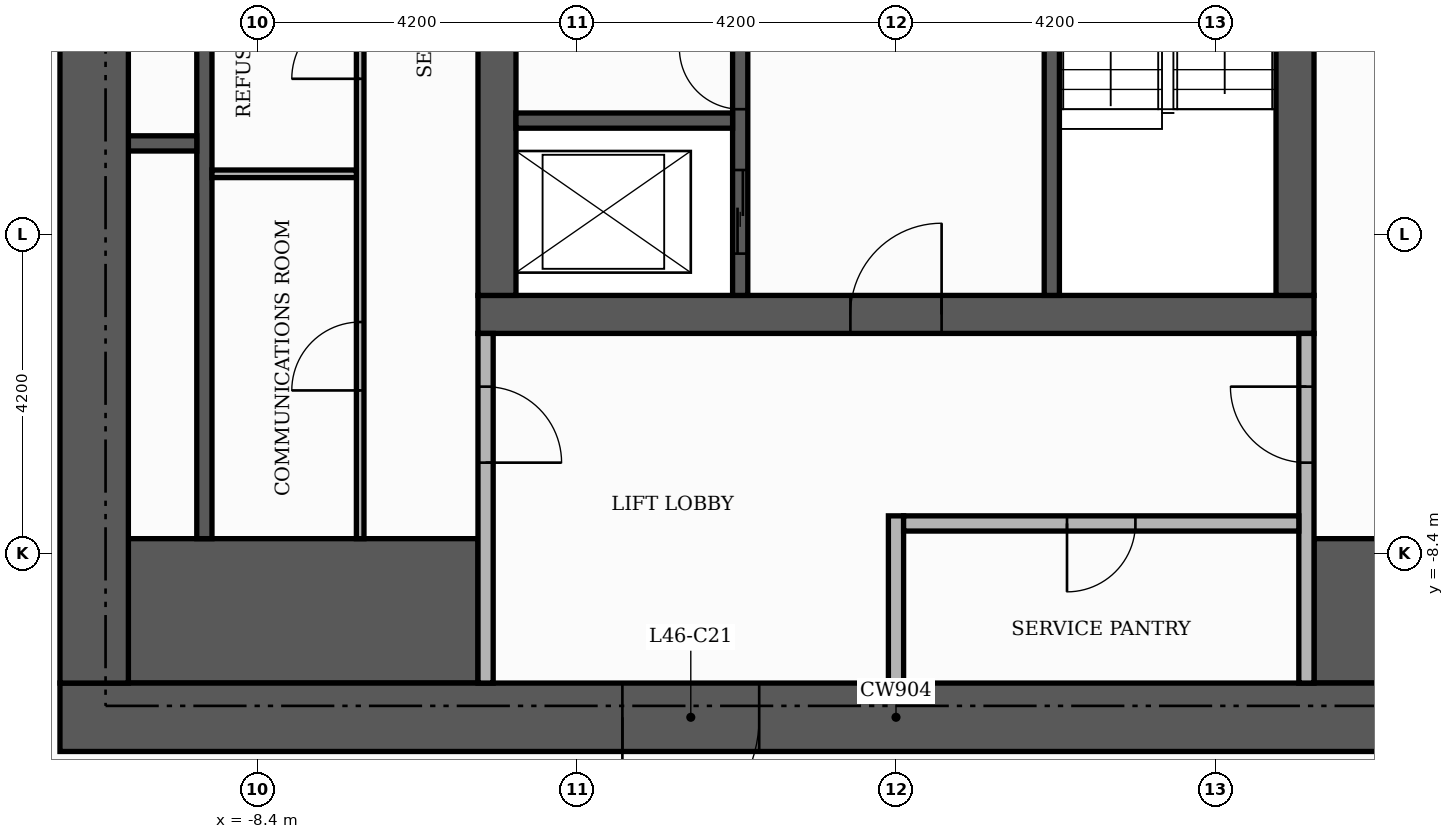
"""IFC4 building model, lengths in metres.
Left out: names, types, materials, properties, quantities, classifications, styles, units other than length and angle.
Written with IfcOpenShell. Run it as: python <this file> out.ifc"""

import sys

from ifc_helpers import new_model, si_unit, direction, frame, frame_2d, origin, place, context, subcontext, project, spatial, rectangle, extrude, element, fill, save


model = new_model("IFC4")
c1 = context("Model", 3, precision=1e-05, world=origin(), true_north=direction((0.0, 1.0)))
c2 = subcontext(c1, "Body", "Model", "MODEL_VIEW")
j1 = project(units=[si_unit("LENGTHUNIT", "METRE"), si_unit("PLANEANGLEUNIT", "RADIAN")], contexts=[c1])
p1 = place(None, origin())
s1 = spatial("IfcSite", under=j1, at=p1, CompositionType="ELEMENT")
p2 = place(p1, origin())
s2 = spatial("IfcBuilding", under=s1, at=p2, CompositionType="ELEMENT")
p3 = place(p2, frame((0.0, 0.0, 196.2)))
s3 = spatial("IfcBuildingStorey", under=s2, at=p3, CompositionType="ELEMENT", Elevation=196.2)
p4 = place(p3, frame((-5.5, -5.25, 0.0), z_axis=(0.0, 0.0, 1.0), x_axis=(1.0, 0.0, 0.0)))
e1 = element("IfcWall", 1, at=p4, inside=s3, PredefinedType="SHEAR", context=c2, shape_type="SweptSolid", body=[
    extrude(rectangle(XDim=11.0, YDim=0.5, at=frame_2d((5.5, 0.0))), origin(), (0.0, 0.0, 1.0), 3.48),
])
p5 = place(p4, frame((4.9, 0.0, 0.0)))
e2 = element("IfcOpeningElement", 2, at=p5, cuts=e1, PredefinedType="OPENING", context=c2, shape_type="SweptSolid", body=[
    extrude(rectangle(XDim=1.2, YDim=2.1, at=frame_2d((0.6, 1.05))), frame((0.0, 0.26, 0.0), z_axis=(0.0, -1.0, 0.0), x_axis=(1.0, 0.0, 0.0)), (0.0, 0.0, 1.0), 0.52),
])
for number, where, z_axis, x_axis in (
    (3, (-5.25, -5.0, 0.0), (0.0, 0.0, 1.0), (0.0, 1.0, 0.0)),
    (4, (5.25, -5.0, 0.0), (0.0, 0.0, 1.0), (0.0, 1.0, 0.0)),
):
    element("IfcWall", number, at=place(p3, frame(where, z_axis=z_axis, x_axis=x_axis)), inside=s3, PredefinedType="SHEAR", context=c2, shape_type="SweptSolid", body=[
        extrude(rectangle(XDim=10.5, YDim=0.5, at=frame_2d((5.25, 0.0))), origin(), (0.0, 0.0, 1.0), 3.48),
    ])
for number, where, z_axis, x_axis in (
    (5, (-10.1, -9.15, 0.0), (0.0, 0.0, 1.0), (1.0, 0.0, 0.0)),
    (6, (5.5, -9.15, 0.0), (0.0, 0.0, 1.0), (1.0, 0.0, 0.0)),
):
    element("IfcWall", number, at=place(p3, frame(where, z_axis=z_axis, x_axis=x_axis)), inside=s3, PredefinedType="SHEAR", context=c2, shape_type="SweptSolid", body=[
        extrude(rectangle(XDim=4.6, YDim=1.9, at=frame_2d((2.3, 0.0))), origin(), (0.0, 0.0, 1.0), 3.48),
    ])
p6 = place(p3, frame((2.05, -5.0, 0.0), z_axis=(0.0, 0.0, 1.0), x_axis=(0.0, 1.0, 0.0)))
e7 = element("IfcWall", 7, at=p6, inside=s3, PredefinedType="SHEAR", context=c2, shape_type="SweptSolid", body=[
    extrude(rectangle(XDim=6.6, YDim=0.2, at=frame_2d((3.3, 0.0))), origin(), (0.0, 0.0, 1.0), 3.48),
])
p7 = place(p6, frame((5.25, 0.0, 0.0)))
e8 = element("IfcOpeningElement", 8, at=p7, cuts=e7, PredefinedType="OPENING", context=c2, shape_type="SweptSolid", body=[
    extrude(rectangle(XDim=1.0, YDim=2.1, at=frame_2d((0.5, 1.05))), frame((0.0, 0.11, 0.0), z_axis=(0.0, -1.0, 0.0), x_axis=(1.0, 0.0, 0.0)), (0.0, 0.0, 1.0), 0.22),
])
p8 = place(p3, frame((-9.1, -8.2, 0.0), z_axis=(0.0, 0.0, 1.0), x_axis=(0.0, 1.0, 0.0)))
e9 = element("IfcWall", 9, at=p8, inside=s3, PredefinedType="SHEAR", context=c2, shape_type="SweptSolid", body=[
    extrude(rectangle(XDim=16.4, YDim=0.2, at=frame_2d((8.2, 0.0))), origin(), (0.0, 0.0, 1.0), 3.48),
])
p9 = place(p3, frame((-2.05, -5.0, 0.0), z_axis=(0.0, 0.0, 1.0), x_axis=(0.0, 1.0, 0.0)))
e10 = element("IfcWall", 10, at=p9, inside=s3, PredefinedType="SHEAR", context=c2, shape_type="SweptSolid", body=[
    extrude(rectangle(XDim=3.4, YDim=0.2, at=frame_2d((1.7, 0.0))), origin(), (0.0, 0.0, 1.0), 3.48),
])
p10 = place(p9, frame((0.55, 0.0, 0.0)))
e11 = element("IfcOpeningElement", 11, at=p10, cuts=e10, PredefinedType="OPENING", context=c2, shape_type="SweptSolid", body=[
    extrude(rectangle(XDim=1.1, YDim=2.1, at=frame_2d((0.55, 1.05))), frame((0.0, 0.11, 0.0), z_axis=(0.0, -1.0, 0.0), x_axis=(1.0, 0.0, 0.0)), (0.0, 0.0, 1.0), 0.22),
])
p11 = place(p9, frame((2.45, 0.0, 0.0)))
e12 = element("IfcOpeningElement", 12, at=p11, cuts=e10, PredefinedType="OPENING", context=c2, shape_type="SweptSolid", body=[
    extrude(rectangle(XDim=0.8, YDim=2.1, at=frame_2d((0.4, 1.05))), frame((0.0, 0.11, 0.0), z_axis=(0.0, -1.0, 0.0), x_axis=(1.0, 0.0, 0.0)), (0.0, 0.0, 1.0), 0.22),
])
p12 = place(p3, frame((-10.1, -3.0, 0.0), z_axis=(0.0, 0.0, 1.0), x_axis=(1.0, 0.0, 0.0)))
e13 = element("IfcWall", 13, at=p12, inside=s3, PredefinedType="SHEAR", context=c2, shape_type="SweptSolid", body=[
    extrude(rectangle(XDim=0.9, YDim=0.2, at=frame_2d((0.45, 0.0))), origin(), (0.0, 0.0, 1.0), 3.48),
])
p13 = place(p3, frame((-5.0, -2.7, 0.0), z_axis=(0.0, 0.0, 1.0), x_axis=(1.0, 0.0, 0.0)))
e14 = element("IfcWall", 14, at=p13, inside=s3, PredefinedType="SHEAR", context=c2, shape_type="SweptSolid", body=[
    extrude(rectangle(XDim=2.85, YDim=0.2, at=frame_2d((1.425, 0.0))), origin(), (0.0, 0.0, 1.0), 3.48),
])
p14 = place(p3, frame((-11.0, -10.55, 0.0), z_axis=(0.0, 0.0, 1.0), x_axis=(1.0, 0.0, 0.0)))
e15 = element("IfcWall", 15, at=p14, inside=s3, PredefinedType="SHEAR", context=c2, shape_type="SweptSolid", body=[
    extrude(rectangle(XDim=22.0, YDim=0.9, at=frame_2d((11.0, 0.0))), origin(), (0.0, 0.0, 1.0), 3.48),
])
p15 = place(p14, frame((7.4, 0.0, 0.0)))
e16 = element("IfcOpeningElement", 16, at=p15, cuts=e15, PredefinedType="OPENING", context=c2, shape_type="SweptSolid", body=[
    extrude(rectangle(XDim=1.8, YDim=2.2, at=frame_2d((0.9, 1.1))), frame((0.0, 0.46, 0.0), z_axis=(0.0, -1.0, 0.0), x_axis=(1.0, 0.0, 0.0)), (0.0, 0.0, 1.0), 0.92),
])
p16 = place(p3, frame((-10.55, -10.1, 0.0), z_axis=(0.0, 0.0, 1.0), x_axis=(0.0, 1.0, 0.0)))
e17 = element("IfcWall", 17, at=p16, inside=s3, PredefinedType="SHEAR", context=c2, shape_type="SweptSolid", body=[
    extrude(rectangle(XDim=20.2, YDim=0.9, at=frame_2d((10.1, 0.0))), origin(), (0.0, 0.0, 1.0), 3.48),
])
p17 = place(p3, frame((-5.4, -10.1, 0.0), z_axis=(0.0, 0.0, 1.0), x_axis=(0.0, 1.0, 0.0)))
e18 = element("IfcWall", 18, at=p17, inside=s3, PredefinedType="PARTITIONING", context=c2, shape_type="SweptSolid", body=[
    extrude(rectangle(XDim=4.6, YDim=0.2, at=frame_2d((2.3, 0.0))), origin(), (0.0, 0.0, 1.0), 3.48),
])
p18 = place(p17, frame((2.9, 0.0, 0.0)))
e19 = element("IfcOpeningElement", 19, at=p18, cuts=e18, PredefinedType="OPENING", context=c2, shape_type="SweptSolid", body=[
    extrude(rectangle(XDim=1.0, YDim=2.1, at=frame_2d((0.5, 1.05))), frame((0.0, 0.11, 0.0), z_axis=(0.0, -1.0, 0.0), x_axis=(1.0, 0.0, 0.0)), (0.0, 0.0, 1.0), 0.22),
])
p19 = place(p3, frame((0.0, -10.1, 0.0), z_axis=(0.0, 0.0, 1.0), x_axis=(0.0, 1.0, 0.0)))
e20 = element("IfcWall", 20, at=p19, inside=s3, PredefinedType="PARTITIONING", context=c2, shape_type="SweptSolid", body=[
    extrude(rectangle(XDim=2.2, YDim=0.2, at=frame_2d((1.1, 0.0))), origin(), (0.0, 0.0, 1.0), 3.48),
])
p20 = place(p3, frame((5.4, -10.1, 0.0), z_axis=(0.0, 0.0, 1.0), x_axis=(0.0, 1.0, 0.0)))
e21 = element("IfcWall", 21, at=p20, inside=s3, PredefinedType="PARTITIONING", context=c2, shape_type="SweptSolid", body=[
    extrude(rectangle(XDim=4.6, YDim=0.2, at=frame_2d((2.3, 0.0))), origin(), (0.0, 0.0, 1.0), 3.48),
])
p21 = place(p20, frame((2.9, 0.0, 0.0)))
e22 = element("IfcOpeningElement", 22, at=p21, cuts=e21, PredefinedType="OPENING", context=c2, shape_type="SweptSolid", body=[
    extrude(rectangle(XDim=1.0, YDim=2.1, at=frame_2d((0.5, 1.05))), frame((0.0, 0.11, 0.0), z_axis=(0.0, -1.0, 0.0), x_axis=(1.0, 0.0, 0.0)), (0.0, 0.0, 1.0), 0.22),
])
p22 = place(p3, frame((-7.05, -8.2, 0.0), z_axis=(0.0, 0.0, 1.0), x_axis=(0.0, 1.0, 0.0)))
e23 = element("IfcWall", 23, at=p22, inside=s3, PredefinedType="PARTITIONING", context=c2, shape_type="SweptSolid", body=[
    extrude(rectangle(XDim=16.4, YDim=0.1, at=frame_2d((8.2, 0.0))), origin(), (0.0, 0.0, 1.0), 3.48),
])
p23 = place(p22, frame((1.95, 0.0, 0.0)))
e24 = element("IfcOpeningElement", 24, at=p23, cuts=e23, PredefinedType="OPENING", context=c2, shape_type="SweptSolid", body=[
    extrude(rectangle(XDim=0.9, YDim=2.1, at=frame_2d((0.45, 1.05))), frame((0.0, 0.06, 0.0), z_axis=(0.0, -1.0, 0.0), x_axis=(1.0, 0.0, 0.0)), (0.0, 0.0, 1.0), 0.12),
])
p24 = place(p22, frame((6.05, 0.0, 0.0)))
e25 = element("IfcOpeningElement", 25, at=p24, cuts=e23, PredefinedType="OPENING", context=c2, shape_type="SweptSolid", body=[
    extrude(rectangle(XDim=0.9, YDim=2.1, at=frame_2d((0.45, 1.05))), frame((0.0, 0.06, 0.0), z_axis=(0.0, -1.0, 0.0), x_axis=(1.0, 0.0, 0.0)), (0.0, 0.0, 1.0), 0.12),
])
p25 = place(p22, frame((9.45, 0.0, 0.0)))
e26 = element("IfcOpeningElement", 26, at=p25, cuts=e23, PredefinedType="OPENING", context=c2, shape_type="SweptSolid", body=[
    extrude(rectangle(XDim=0.9, YDim=2.1, at=frame_2d((0.45, 1.05))), frame((0.0, 0.06, 0.0), z_axis=(0.0, -1.0, 0.0), x_axis=(1.0, 0.0, 0.0)), (0.0, 0.0, 1.0), 0.12),
])
p26 = place(p22, frame((13.55, 0.0, 0.0)))
e27 = element("IfcOpeningElement", 27, at=p26, cuts=e23, PredefinedType="OPENING", context=c2, shape_type="SweptSolid", body=[
    extrude(rectangle(XDim=0.9, YDim=2.1, at=frame_2d((0.45, 1.05))), frame((0.0, 0.06, 0.0), z_axis=(0.0, -1.0, 0.0), x_axis=(1.0, 0.0, 0.0)), (0.0, 0.0, 1.0), 0.12),
])
p27 = place(p3, frame((0.1, -8.0, 0.0), z_axis=(0.0, 0.0, 1.0), x_axis=(1.0, 0.0, 0.0)))
e28 = element("IfcWall", 28, at=p27, inside=s3, PredefinedType="PARTITIONING", context=c2, shape_type="SweptSolid", body=[
    extrude(rectangle(XDim=5.2, YDim=0.2, at=frame_2d((2.6, 0.0))), origin(), (0.0, 0.0, 1.0), 3.48),
])
p28 = place(p27, frame((2.15, 0.0, 0.0)))
e29 = element("IfcOpeningElement", 29, at=p28, cuts=e28, PredefinedType="OPENING", context=c2, shape_type="SweptSolid", body=[
    extrude(rectangle(XDim=0.9, YDim=2.1, at=frame_2d((0.45, 1.05))), frame((0.0, 0.11, 0.0), z_axis=(0.0, -1.0, 0.0), x_axis=(1.0, 0.0, 0.0)), (0.0, 0.0, 1.0), 0.22),
])
p29 = place(p3, frame((-9.0, -3.4, 0.0), z_axis=(0.0, 0.0, 1.0), x_axis=(1.0, 0.0, 0.0)))
e30 = element("IfcWall", 30, at=p29, inside=s3, PredefinedType="PARTITIONING", context=c2, shape_type="SweptSolid", body=[
    extrude(rectangle(XDim=1.9, YDim=0.1, at=frame_2d((0.95, 0.0))), origin(), (0.0, 0.0, 1.0), 3.48),
])
p30 = place(p10, origin())
e31 = element("IfcDoor", 31, at=p30, inside=s3, OperationType="SLIDING_TO_LEFT", PredefinedType="DOOR", context=c2, shape_type="SweptSolid", body=[
    extrude(rectangle(XDim=1.1, YDim=2.1, at=frame_2d((0.55, 1.05))), frame((0.0, 0.025, 0.0), z_axis=(0.0, -1.0, 0.0), x_axis=(1.0, 0.0, 0.0)), (0.0, 0.0, 1.0), 0.05),
])
fill(e11, e31)
p31 = place(p11, origin())
e32 = element("IfcDoor", 32, at=p31, inside=s3, OperationType="SINGLE_SWING_RIGHT", PredefinedType="DOOR", context=c2, shape_type="SweptSolid", body=[
    extrude(rectangle(XDim=0.8, YDim=2.1, at=frame_2d((0.4, 1.05))), frame((0.0, 0.025, 0.0), z_axis=(0.0, -1.0, 0.0), x_axis=(1.0, 0.0, 0.0)), (0.0, 0.0, 1.0), 0.05),
])
fill(e12, e32)
p32 = place(p5, origin())
e33 = element("IfcDoor", 33, at=p32, inside=s3, OperationType="SINGLE_SWING_RIGHT", PredefinedType="DOOR", context=c2, shape_type="SweptSolid", body=[
    extrude(rectangle(XDim=1.2, YDim=2.1, at=frame_2d((0.6, 1.05))), frame((0.0, 0.025, 0.0), z_axis=(0.0, -1.0, 0.0), x_axis=(1.0, 0.0, 0.0)), (0.0, 0.0, 1.0), 0.05),
])
fill(e2, e33)
p33 = place(p18, frame((1.0, 0.0, 0.0), z_axis=(0.0, 0.0, 1.0), x_axis=(-1.0, 0.0, 0.0)))
e34 = element("IfcDoor", 34, at=p33, inside=s3, OperationType="SINGLE_SWING_LEFT", PredefinedType="DOOR", context=c2, shape_type="SweptSolid", body=[
    extrude(rectangle(XDim=1.0, YDim=2.1, at=frame_2d((0.5, 1.05))), frame((0.0, 0.025, 0.0), z_axis=(0.0, -1.0, 0.0), x_axis=(1.0, 0.0, 0.0)), (0.0, 0.0, 1.0), 0.05),
])
fill(e19, e34)
p34 = place(p21, origin())
e35 = element("IfcDoor", 35, at=p34, inside=s3, OperationType="SINGLE_SWING_RIGHT", PredefinedType="DOOR", context=c2, shape_type="SweptSolid", body=[
    extrude(rectangle(XDim=1.0, YDim=2.1, at=frame_2d((0.5, 1.05))), frame((0.0, 0.025, 0.0), z_axis=(0.0, -1.0, 0.0), x_axis=(1.0, 0.0, 0.0)), (0.0, 0.0, 1.0), 0.05),
])
fill(e22, e35)
p35 = place(p15, frame((1.8, 0.0, 0.0), z_axis=(0.0, 0.0, 1.0), x_axis=(-1.0, 0.0, 0.0)))
e36 = element("IfcDoor", 36, at=p35, inside=s3, OperationType="DOUBLE_DOOR_SINGLE_SWING", PredefinedType="DOOR", context=c2, shape_type="SweptSolid", body=[
    extrude(rectangle(XDim=1.8, YDim=2.2, at=frame_2d((0.9, 1.1))), frame((0.0, 0.025, 0.0), z_axis=(0.0, -1.0, 0.0), x_axis=(1.0, 0.0, 0.0)), (0.0, 0.0, 1.0), 0.05),
])
fill(e16, e36)
p36 = place(p28, frame((0.9, 0.0, 0.0), z_axis=(0.0, 0.0, 1.0), x_axis=(-1.0, 0.0, 0.0)))
e37 = element("IfcDoor", 37, at=p36, inside=s3, OperationType="SINGLE_SWING_LEFT", PredefinedType="DOOR", context=c2, shape_type="SweptSolid", body=[
    extrude(rectangle(XDim=0.9, YDim=2.1, at=frame_2d((0.45, 1.05))), frame((0.0, 0.025, 0.0), z_axis=(0.0, -1.0, 0.0), x_axis=(1.0, 0.0, 0.0)), (0.0, 0.0, 1.0), 0.05),
])
fill(e29, e37)
p37 = place(p23, origin())
e38 = element("IfcDoor", 38, at=p37, inside=s3, OperationType="SINGLE_SWING_LEFT", PredefinedType="DOOR", context=c2, shape_type="SweptSolid", body=[
    extrude(rectangle(XDim=0.9, YDim=2.1, at=frame_2d((0.45, 1.05))), frame((0.0, 0.025, 0.0), z_axis=(0.0, -1.0, 0.0), x_axis=(1.0, 0.0, 0.0)), (0.0, 0.0, 1.0), 0.05),
])
fill(e24, e38)
p38 = place(p24, origin())
e39 = element("IfcDoor", 39, at=p38, inside=s3, OperationType="SINGLE_SWING_LEFT", PredefinedType="DOOR", context=c2, shape_type="SweptSolid", body=[
    extrude(rectangle(XDim=0.9, YDim=2.1, at=frame_2d((0.45, 1.05))), frame((0.0, 0.025, 0.0), z_axis=(0.0, -1.0, 0.0), x_axis=(1.0, 0.0, 0.0)), (0.0, 0.0, 1.0), 0.05),
])
fill(e25, e39)
save(model, sys.argv[1])
